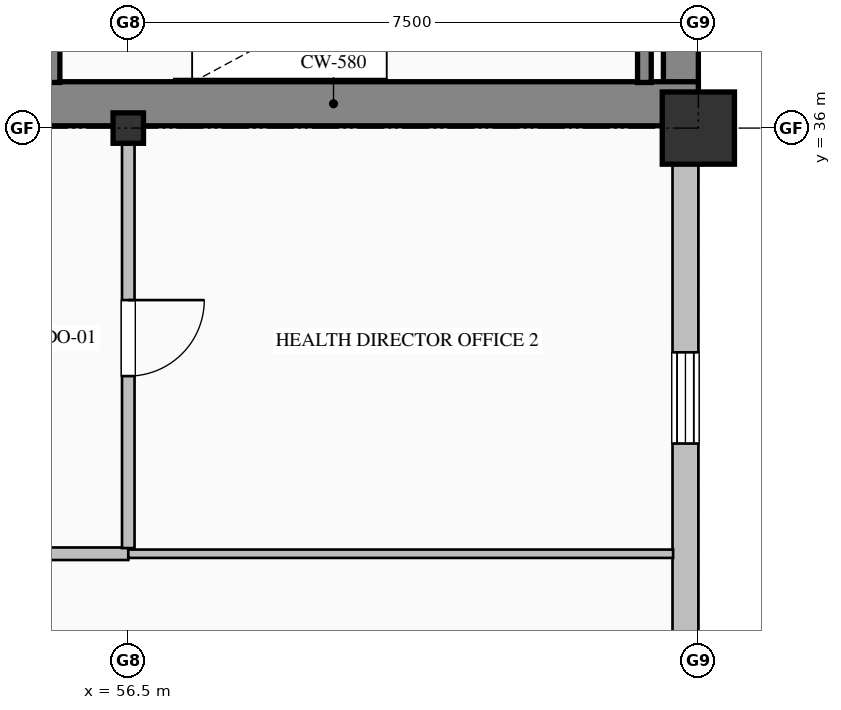
"""IFC4 building model, lengths in metres.
Left out: names, types, materials, properties, quantities, classifications, styles, units other than length and angle.
Written with IfcOpenShell. Run it as: python <this file> out.ifc"""

import sys

from ifc_helpers import new_model, si_unit, direction, frame, frame_2d, origin, origin_2d, place, context, subcontext, project, spatial, rectangle, hollow_rectangle, i_section, extrude, element, fill, save


model = new_model("IFC4")
c1 = context("Model", 3, precision=1e-05, world=origin(), true_north=direction((0.0, 1.0)))
c2 = subcontext(c1, "Body", "Model", "MODEL_VIEW")
j1 = project(units=[si_unit("LENGTHUNIT", "METRE"), si_unit("PLANEANGLEUNIT", "RADIAN")], contexts=[c1])
p1 = place(None, origin())
s1 = spatial("IfcSite", under=j1, at=p1, CompositionType="ELEMENT")
p2 = place(p1, origin())
s2 = spatial("IfcBuilding", under=s1, at=p2, CompositionType="ELEMENT")
p3 = place(p2, frame((0.0, 0.0, 261.8)))
s3 = spatial("IfcBuildingStorey", under=s2, at=p3, CompositionType="ELEMENT", Elevation=261.8)
p4 = place(p3, frame((63.77, 36.32, 0.0), z_axis=(0.0, 0.0, 1.0), x_axis=(0.0, 1.0, 0.0)))
e1 = element("IfcWall", 1, at=p4, inside=s3, PredefinedType="SHEAR", context=c2, shape_type="SweptSolid", body=[
    extrude(rectangle(XDim=15.22, YDim=0.46, at=frame_2d((7.61, 0.0))), origin(), (0.0, 0.0, 1.0), 3.775),
])
p5 = place(p3, frame((54.4, 36.32, 0.0), z_axis=(0.0, 0.0, 1.0), x_axis=(1.0, 0.0, 0.0)))
e2 = element("IfcWall", 2, at=p5, inside=s3, PredefinedType="SHEAR", context=c2, shape_type="SweptSolid", body=[
    extrude(rectangle(XDim=9.6, YDim=0.58, at=frame_2d((4.8, 0.0))), origin(), (0.0, 0.0, 1.0), 4.0),
])
p6 = place(p3, frame((56.5, 36.0, 0.0), z_axis=(0.0, 0.0, 1.0), x_axis=(1.0, 0.0, 0.0)))
e3 = element("IfcColumn", 3, at=p6, inside=s3, PredefinedType="COLUMN", context=c2, shape_type="SweptSolid", body=[
    extrude(i_section(OverallWidth=0.4, OverallDepth=0.4, WebThickness=0.013, FlangeThickness=0.021, FilletRadius=0.022, at=origin_2d()), origin(), (0.0, 0.0, 1.0), 4.0),
])
p7 = place(p3, frame((64.0, 36.0, 0.0), z_axis=(0.0, 0.0, 1.0), x_axis=(1.0, 0.0, 0.0)))
e4 = element("IfcColumn", 4, at=p7, inside=s3, PredefinedType="COLUMN", context=c2, shape_type="SweptSolid", body=[
    extrude(hollow_rectangle(XDim=0.95, YDim=0.95, WallThickness=0.036, at=origin_2d()), origin(), (0.0, 0.0, 1.0), 4.0),
])
p8 = place(p3, frame((63.83, 36.05, 0.0), z_axis=(0.0, 0.0, 1.0), x_axis=(0.0, -1.0, 0.0)))
e5 = element("IfcWall", 5, at=p8, inside=s3, PredefinedType="SOLIDWALL", context=c2, shape_type="SweptSolid", body=[
    extrude(rectangle(XDim=19.55, YDim=0.34, at=frame_2d((9.775, 0.0))), origin(), (0.0, 0.0, 1.0), 3.325),
])
p9 = place(p8, frame((3.0, 0.0, 0.9)))
e6 = element("IfcOpeningElement", 6, at=p9, cuts=e5, PredefinedType="OPENING", context=c2, shape_type="SweptSolid", body=[
    extrude(rectangle(XDim=1.2, YDim=1.85, at=frame_2d((0.6, 0.925))), frame((0.0, 0.18, 0.0), z_axis=(0.0, -1.0, 0.0), x_axis=(1.0, 0.0, 0.0)), (0.0, 0.0, 1.0), 0.36),
])
p10 = place(p8, frame((10.05, 0.0, 0.7)))
e7 = element("IfcOpeningElement", 7, at=p10, cuts=e5, PredefinedType="OPENING", context=c2, shape_type="SweptSolid", body=[
    extrude(rectangle(XDim=1.5, YDim=2.4, at=frame_2d((0.75, 1.2))), frame((0.0, 0.18, 0.0), z_axis=(0.0, -1.0, 0.0), x_axis=(1.0, 0.0, 0.0)), (0.0, 0.0, 1.0), 0.36),
])
p11 = place(p8, frame((13.8, 0.0, 0.9)))
e8 = element("IfcOpeningElement", 8, at=p11, cuts=e5, PredefinedType="OPENING", context=c2, shape_type="SweptSolid", body=[
    extrude(rectangle(XDim=1.2, YDim=1.85, at=frame_2d((0.6, 0.925))), frame((0.0, 0.18, 0.0), z_axis=(0.0, -1.0, 0.0), x_axis=(1.0, 0.0, 0.0)), (0.0, 0.0, 1.0), 0.36),
])
p12 = place(p3, frame((55.48, 39.75, 0.0), z_axis=(0.0, 0.0, 1.0), x_axis=(0.0, -1.0, 0.0)))
e9 = element("IfcWall", 9, at=p12, inside=s3, PredefinedType="SOLIDWALL", context=c2, shape_type="SweptSolid", body=[
    extrude(rectangle(XDim=3.15, YDim=0.24, at=frame_2d((1.575, 0.0))), origin(), (0.0, 0.0, 1.0), 4.0),
])
p13 = place(p12, frame((1.0, 0.0, 0.0)))
e10 = element("IfcOpeningElement", 10, at=p13, cuts=e9, PredefinedType="OPENING", context=c2, shape_type="SweptSolid", body=[
    extrude(rectangle(XDim=1.15, YDim=2.2, at=frame_2d((0.575, 1.1))), frame((0.0, 0.13, 0.0), z_axis=(0.0, -1.0, 0.0), x_axis=(1.0, 0.0, 0.0)), (0.0, 0.0, 1.0), 0.26),
])
p14 = place(p3, frame((63.29, 36.6, 0.0), z_axis=(0.0, 0.0, 1.0), x_axis=(0.0, 1.0, 0.0)))
e11 = element("IfcWall", 11, at=p14, inside=s3, PredefinedType="SOLIDWALL", context=c2, shape_type="SweptSolid", body=[
    extrude(rectangle(XDim=3.15, YDim=0.18, at=frame_2d((1.575, 0.0))), origin(), (0.0, 0.0, 1.0), 4.0),
])
p15 = place(p3, frame((56.5, 30.4, 0.0), z_axis=(0.0, 0.0, 1.0), x_axis=(-1.0, 0.0, 0.0)))
e12 = element("IfcWall", 12, at=p15, inside=s3, PredefinedType="PARTITIONING", context=c2, shape_type="SweptSolid", body=[
    extrude(rectangle(XDim=11.3, YDim=0.165, at=frame_2d((5.65, 0.0))), origin(), (0.0, 0.0, 1.0), 3.775),
])
p16 = place(p3, frame((56.5, 36.0, 0.0), z_axis=(0.0, 0.0, 1.0), x_axis=(0.0, -1.0, 0.0)))
e13 = element("IfcWall", 13, at=p16, inside=s3, PredefinedType="PARTITIONING", context=c2, shape_type="SweptSolid", body=[
    extrude(rectangle(XDim=5.525, YDim=0.165, at=frame_2d((2.763, 0.0))), origin(), (0.0, 0.0, 1.0), 3.179),
])
p17 = place(p16, frame((2.263, 0.0, 0.0)))
e14 = element("IfcOpeningElement", 14, at=p17, cuts=e13, PredefinedType="OPENING", context=c2, shape_type="SweptSolid", body=[
    extrude(rectangle(XDim=1.0, YDim=2.15, at=frame_2d((0.5, 1.075))), frame((0.0, 0.093, 0.0), z_axis=(0.0, -1.0, 0.0), x_axis=(1.0, 0.0, 0.0)), (0.0, 0.0, 1.0), 0.185),
])
p18 = place(p3, frame((56.5, 30.4, 0.0), z_axis=(0.0, 0.0, 1.0), x_axis=(1.0, 0.0, 0.0)))
e15 = element("IfcWall", 15, at=p18, inside=s3, PredefinedType="MOVABLE", context=c2, shape_type="SweptSolid", body=[
    extrude(rectangle(XDim=7.168, YDim=0.11, at=frame_2d((3.584, 0.0))), origin(), (0.0, 0.0, 1.0), 3.775),
])
p19 = place(p9, origin())
e16 = element("IfcWindow", 16, at=p19, inside=s3, PartitioningType="DOUBLE_PANEL_VERTICAL", PredefinedType="WINDOW", context=c2, shape_type="SweptSolid", body=[
    extrude(rectangle(XDim=1.2, YDim=1.85, at=frame_2d((0.6, 0.925))), frame((0.0, 0.15, 0.0), z_axis=(0.0, -1.0, 0.0), x_axis=(1.0, 0.0, 0.0)), (0.0, 0.0, 1.0), 0.06),
])
fill(e6, e16)
p20 = place(p17, origin())
e17 = element("IfcDoor", 17, at=p20, inside=s3, OperationType="SINGLE_SWING_LEFT", PredefinedType="DOOR", context=c2, shape_type="SweptSolid", body=[
    extrude(rectangle(XDim=1.0, YDim=2.15, at=frame_2d((0.5, 1.075))), frame((0.0, 0.025, 0.0), z_axis=(0.0, -1.0, 0.0), x_axis=(1.0, 0.0, 0.0)), (0.0, 0.0, 1.0), 0.05),
])
fill(e14, e17)
save(model, sys.argv[1])
